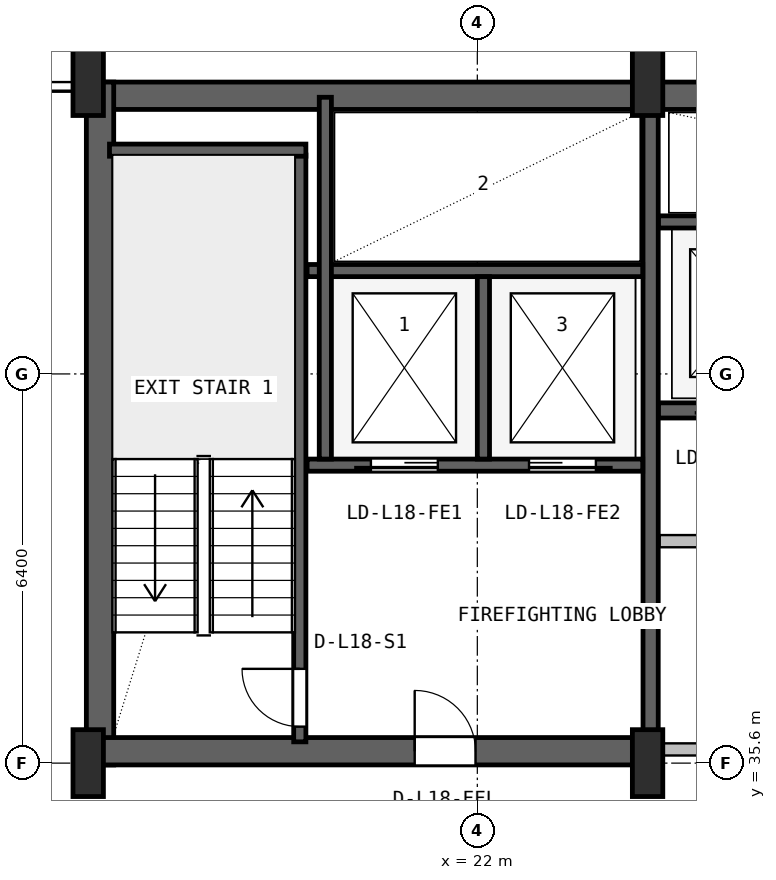
"""IFC4 building model, lengths in metres.
Left out: names, types, materials, properties, quantities, classifications, styles, units other than length and angle.
Written with IfcOpenShell. Run it as: python <this file> out.ifc"""

import sys

from ifc_helpers import new_model, si_unit, direction, frame, frame_2d, origin, origin_2d, place, context, subcontext, project, spatial, rectangle, i_section, extrude, source, transform, mapped, element, fill, save


model = new_model("IFC4")
c1 = context("Model", 3, precision=1e-05, world=origin(), true_north=direction((0.0, 1.0)))
c2 = subcontext(c1, "Body", "Model", "MODEL_VIEW")
j1 = project(units=[si_unit("LENGTHUNIT", "METRE"), si_unit("PLANEANGLEUNIT", "RADIAN")], contexts=[c1])
p1 = place(None, origin())
s1 = spatial("IfcSite", under=j1, at=p1, CompositionType="ELEMENT")
p2 = place(p1, origin())
s2 = spatial("IfcBuilding", under=s1, at=p2, CompositionType="ELEMENT")
p3 = place(p2, frame((0.0, 0.0, 78.3)))
s3 = spatial("IfcBuildingStorey", under=s2, at=p3, CompositionType="ELEMENT", Elevation=78.3)
p4 = place(p3, frame((15.6, 46.575, 0.0), z_axis=(0.0, 0.0, 1.0), x_axis=(1.0, 0.0, 0.0)))
e1 = element("IfcWall", 1, at=p4, inside=s3, PredefinedType="SHEAR", context=c2, shape_type="SweptSolid", body=[
    extrude(rectangle(XDim=36.8, YDim=0.45, at=frame_2d((18.4, 0.0))), origin(), (0.0, 0.0, 1.0), 3.58),
])
p5 = place(p3, frame((15.795, 35.57, 0.0), z_axis=(0.0, 0.0, 1.0), x_axis=(0.0, 1.0, 0.0)))
e2 = element("IfcWall", 2, at=p5, inside=s3, PredefinedType="SHEAR", context=c2, shape_type="SweptSolid", body=[
    extrude(rectangle(XDim=11.23, YDim=0.45, at=frame_2d((5.615, 0.0))), origin(), (0.0, 0.0, 1.0), 3.58),
])
p6 = place(p3, frame((15.57, 35.795, 0.0), z_axis=(0.0, 0.0, 1.0), x_axis=(1.0, 0.0, 0.0)))
e3 = element("IfcWall", 3, at=p6, inside=s3, PredefinedType="SHEAR", context=c2, shape_type="SweptSolid", body=[
    extrude(rectangle(XDim=9.23, YDim=0.45, at=frame_2d((4.615, 0.0))), origin(), (0.0, 0.0, 1.0), 3.58),
])
p7 = place(p6, frame((5.4, 0.0, 0.0)))
e4 = element("IfcOpeningElement", 4, at=p7, cuts=e3, PredefinedType="OPENING", context=c2, shape_type="SweptSolid", body=[
    extrude(rectangle(XDim=1.0, YDim=2.1, at=frame_2d((0.5, 1.05))), frame((0.0, 0.235, 0.0), z_axis=(0.0, -1.0, 0.0), x_axis=(1.0, 0.0, 0.0)), (0.0, 0.0, 1.0), 0.47),
])
m1 = source(origin(), c2, "Body", "SweptSolid", [
    extrude(i_section(OverallWidth=0.5, OverallDepth=1.1, WebThickness=0.018, FlangeThickness=0.032, FilletRadius=0.018, at=origin_2d()), origin(), (0.0, 0.0, 1.0), 3.9),
])
for number, where, z_axis, x_axis in (
    (5, (15.6, 35.6, 0.0), (0.0, 0.0, 1.0), (1.0, 0.0, 0.0)),
    (6, (15.6, 46.8, 0.0), (0.0, 0.0, 1.0), (1.0, 0.0, 0.0)),
    (7, (24.8, 35.6, 0.0), (0.0, 0.0, 1.0), (1.0, 0.0, 0.0)),
    (8, (24.8, 46.8, 0.0), (0.0, 0.0, 1.0), (1.0, 0.0, 0.0)),
):
    element("IfcColumn", number, at=place(p3, frame(where, z_axis=z_axis, x_axis=x_axis)), inside=s3, PredefinedType="COLUMN", context=c2, shape_type="MappedRepresentation", body=[
        mapped(m1, transform((0.0, 0.0, 0.0), x_axis=(1.0, 0.0, 0.0), y_axis=(0.0, 1.0, 0.0), z_axis=(0.0, 0.0, 1.0), scale=1.0)),
    ])
p8 = place(p3, frame((19.08, 35.95, 0.0), z_axis=(0.0, 0.0, 1.0), x_axis=(0.0, 1.0, 0.0)))
e9 = element("IfcWall", 9, at=p8, inside=s3, PredefinedType="SHEAR", context=c2, shape_type="SweptSolid", body=[
    extrude(rectangle(XDim=9.65, YDim=0.2, at=frame_2d((4.825, 0.0))), origin(), (0.0, 0.0, 1.0), 3.58),
])
p9 = place(p8, frame((0.25, 0.0, 0.0)))
e10 = element("IfcOpeningElement", 10, at=p9, cuts=e9, PredefinedType="OPENING", context=c2, shape_type="SweptSolid", body=[
    extrude(rectangle(XDim=0.95, YDim=2.1, at=frame_2d((0.475, 1.05))), frame((0.0, 0.11, 0.0), z_axis=(0.0, -1.0, 0.0), x_axis=(1.0, 0.0, 0.0)), (0.0, 0.0, 1.0), 0.22),
])
p10 = place(p3, frame((15.95, 45.68, 0.0), z_axis=(0.0, 0.0, 1.0), x_axis=(1.0, 0.0, 0.0)))
e11 = element("IfcWall", 11, at=p10, inside=s3, PredefinedType="SHEAR", context=c2, shape_type="SweptSolid", body=[
    extrude(rectangle(XDim=3.23, YDim=0.2, at=frame_2d((1.615, 0.0))), origin(), (0.0, 0.0, 1.0), 3.58),
])
p11 = place(p3, frame((24.85, 36.05, 0.0), z_axis=(0.0, 0.0, 1.0), x_axis=(0.0, 1.0, 0.0)))
e12 = element("IfcWall", 12, at=p11, inside=s3, PredefinedType="SHEAR", context=c2, shape_type="SweptSolid", body=[
    extrude(rectangle(XDim=10.45, YDim=0.25, at=frame_2d((5.225, 0.0))), origin(), (0.0, 0.0, 1.0), 3.58),
])
p12 = place(p3, frame((19.2, 40.5, 0.0), z_axis=(0.0, 0.0, 1.0), x_axis=(1.0, 0.0, 0.0)))
e13 = element("IfcWall", 13, at=p12, inside=s3, PredefinedType="SHEAR", context=c2, shape_type="SweptSolid", body=[
    extrude(rectangle(XDim=5.52, YDim=0.2, at=frame_2d((2.76, 0.0))), origin(), (0.0, 0.0, 1.0), 3.58),
])
p13 = place(p12, frame((1.05, 0.0, 0.0)))
e14 = element("IfcOpeningElement", 14, at=p13, cuts=e13, PredefinedType="OPENING", context=c2, shape_type="SweptSolid", body=[
    extrude(rectangle(XDim=1.1, YDim=2.18, at=frame_2d((0.55, 1.09))), frame((0.0, 0.11, 0.0), z_axis=(0.0, -1.0, 0.0), x_axis=(1.0, 0.0, 0.0)), (0.0, 0.0, 1.0), 0.22),
])
p14 = place(p12, frame((3.65, 0.0, 0.0)))
e15 = element("IfcOpeningElement", 15, at=p14, cuts=e13, PredefinedType="OPENING", context=c2, shape_type="SweptSolid", body=[
    extrude(rectangle(XDim=1.1, YDim=2.18, at=frame_2d((0.55, 1.09))), frame((0.0, 0.11, 0.0), z_axis=(0.0, -1.0, 0.0), x_axis=(1.0, 0.0, 0.0)), (0.0, 0.0, 1.0), 0.22),
])
p15 = place(p3, frame((19.2, 43.7, 0.0), z_axis=(0.0, 0.0, 1.0), x_axis=(1.0, 0.0, 0.0)))
e16 = element("IfcWall", 16, at=p15, inside=s3, PredefinedType="SHEAR", context=c2, shape_type="SweptSolid", body=[
    extrude(rectangle(XDim=5.52, YDim=0.2, at=frame_2d((2.76, 0.0))), origin(), (0.0, 0.0, 1.0), 3.58),
])
p16 = place(p3, frame((22.1, 40.6, 0.0), z_axis=(0.0, 0.0, 1.0), x_axis=(0.0, 1.0, 0.0)))
e17 = element("IfcWall", 17, at=p16, inside=s3, PredefinedType="SHEAR", context=c2, shape_type="SweptSolid", body=[
    extrude(rectangle(XDim=3.0, YDim=0.2, at=frame_2d((1.5, 0.0))), origin(), (0.0, 0.0, 1.0), 3.58),
])
p17 = place(p3, frame((19.5, 40.6, 0.0), z_axis=(0.0, 0.0, 1.0), x_axis=(0.0, 1.0, 0.0)))
e18 = element("IfcWall", 18, at=p17, inside=s3, PredefinedType="SHEAR", context=c2, shape_type="SweptSolid", body=[
    extrude(rectangle(XDim=5.95, YDim=0.2, at=frame_2d((2.975, 0.0))), origin(), (0.0, 0.0, 1.0), 3.58),
])
p18 = place(p3, frame((24.98, 41.4, 0.0), z_axis=(0.0, 0.0, 1.0), x_axis=(1.0, 0.0, 0.0)))
e19 = element("IfcWall", 19, at=p18, inside=s3, PredefinedType="SHEAR", context=c2, shape_type="SweptSolid", body=[
    extrude(rectangle(XDim=23.82, YDim=0.25, at=frame_2d((11.91, 0.0))), origin(), (0.0, 0.0, 1.0), 3.58),
])
p19 = place(p18, frame((0.87, 0.0, 0.0)))
e20 = element("IfcOpeningElement", 20, at=p19, cuts=e19, PredefinedType="OPENING", context=c2, shape_type="SweptSolid", body=[
    extrude(rectangle(XDim=1.1, YDim=2.18, at=frame_2d((0.55, 1.09))), frame((0.0, 0.135, 0.0), z_axis=(0.0, -1.0, 0.0), x_axis=(1.0, 0.0, 0.0)), (0.0, 0.0, 1.0), 0.27),
])
p20 = place(p18, frame((3.47, 0.0, 0.0)))
e21 = element("IfcOpeningElement", 21, at=p20, cuts=e19, PredefinedType="OPENING", context=c2, shape_type="SweptSolid", body=[
    extrude(rectangle(XDim=1.1, YDim=2.18, at=frame_2d((0.55, 1.09))), frame((0.0, 0.135, 0.0), z_axis=(0.0, -1.0, 0.0), x_axis=(1.0, 0.0, 0.0)), (0.0, 0.0, 1.0), 0.27),
])
p21 = place(p18, frame((6.07, 0.0, 0.0)))
e22 = element("IfcOpeningElement", 22, at=p21, cuts=e19, PredefinedType="OPENING", context=c2, shape_type="SweptSolid", body=[
    extrude(rectangle(XDim=1.1, YDim=2.18, at=frame_2d((0.55, 1.09))), frame((0.0, 0.135, 0.0), z_axis=(0.0, -1.0, 0.0), x_axis=(1.0, 0.0, 0.0)), (0.0, 0.0, 1.0), 0.27),
])
p22 = place(p3, frame((24.98, 44.5, 0.0), z_axis=(0.0, 0.0, 1.0), x_axis=(1.0, 0.0, 0.0)))
e23 = element("IfcWall", 23, at=p22, inside=s3, PredefinedType="SHEAR", context=c2, shape_type="SweptSolid", body=[
    extrude(rectangle(XDim=7.87, YDim=0.2, at=frame_2d((3.935, 0.0))), origin(), (0.0, 0.0, 1.0), 3.58),
])
p23 = place(p3, frame((25.0, 35.825, 0.0), z_axis=(0.0, 0.0, 1.0), x_axis=(1.0, 0.0, 0.0)))
e24 = element("IfcWall", 24, at=p23, inside=s3, PredefinedType="PLUMBINGWALL", context=c2, shape_type="SweptSolid", body=[
    extrude(rectangle(XDim=9.75, YDim=0.2, at=frame_2d((4.875, 0.0))), origin(), (0.0, 0.0, 1.0), 2.355),
])
p24 = place(p3, frame((25.0, 39.25, 0.0), z_axis=(0.0, 0.0, 1.0), x_axis=(1.0, 0.0, 0.0)))
e25 = element("IfcWall", 25, at=p24, inside=s3, PredefinedType="PLUMBINGWALL", context=c2, shape_type="SweptSolid", body=[
    extrude(rectangle(XDim=9.75, YDim=0.2, at=frame_2d((4.875, 0.0))), origin(), (0.0, 0.0, 1.0), 3.56),
])
p25 = place(p24, frame((1.75, 0.0, 0.0)))
e26 = element("IfcOpeningElement", 26, at=p25, cuts=e25, PredefinedType="OPENING", context=c2, shape_type="SweptSolid", body=[
    extrude(rectangle(XDim=0.9, YDim=2.06, at=frame_2d((0.45, 1.03))), frame((0.0, 0.11, 0.0), z_axis=(0.0, -1.0, 0.0), x_axis=(1.0, 0.0, 0.0)), (0.0, 0.0, 1.0), 0.22),
])
p26 = place(p24, frame((6.725, 0.0, 0.0)))
e27 = element("IfcOpeningElement", 27, at=p26, cuts=e25, PredefinedType="OPENING", context=c2, shape_type="SweptSolid", body=[
    extrude(rectangle(XDim=0.9, YDim=2.06, at=frame_2d((0.45, 1.03))), frame((0.0, 0.11, 0.0), z_axis=(0.0, -1.0, 0.0), x_axis=(1.0, 0.0, 0.0)), (0.0, 0.0, 1.0), 0.22),
])
m2 = source(origin(), c2, "Body", "SweptSolid", [
    extrude(rectangle(XDim=0.95, YDim=2.1, at=frame_2d((0.475, 1.05))), frame((0.0, 0.025, 0.0), z_axis=(0.0, -1.0, 0.0), x_axis=(1.0, 0.0, 0.0)), (0.0, 0.0, 1.0), 0.05),
])
p27 = place(p9, origin())
e28 = element("IfcDoor", 28, at=p27, inside=s3, OperationType="SINGLE_SWING_RIGHT", PredefinedType="DOOR", context=c2, shape_type="MappedRepresentation", body=[
    mapped(m2, transform((0.0, 0.0, 0.0), x_axis=(1.0, 0.0, 0.0), y_axis=(0.0, 1.0, 0.0), z_axis=(0.0, 0.0, 1.0), scale=1.0)),
])
fill(e10, e28)
m3 = source(origin(), c2, "Body", "SweptSolid", [
    extrude(rectangle(XDim=1.0, YDim=2.1, at=frame_2d((0.5, 1.05))), frame((0.0, 0.025, 0.0), z_axis=(0.0, -1.0, 0.0), x_axis=(1.0, 0.0, 0.0)), (0.0, 0.0, 1.0), 0.05),
])
p28 = place(p7, origin())
e29 = element("IfcDoor", 29, at=p28, inside=s3, OperationType="SINGLE_SWING_LEFT", PredefinedType="DOOR", context=c2, shape_type="MappedRepresentation", body=[
    mapped(m3, transform((0.0, 0.0, 0.0), x_axis=(1.0, 0.0, 0.0), y_axis=(0.0, 1.0, 0.0), z_axis=(0.0, 0.0, 1.0), scale=1.0)),
])
fill(e4, e29)
m4 = source(origin(), c2, "Body", "SweptSolid", [
    extrude(rectangle(XDim=1.1, YDim=2.18, at=frame_2d((0.55, 1.09))), frame((0.0, 0.025, 0.0), z_axis=(0.0, -1.0, 0.0), x_axis=(1.0, 0.0, 0.0)), (0.0, 0.0, 1.0), 0.05),
])
p29 = place(p13, frame((1.1, 0.0, 0.0), z_axis=(0.0, 0.0, 1.0), x_axis=(-1.0, 0.0, 0.0)))
e30 = element("IfcDoor", 30, at=p29, inside=s3, OperationType="SLIDING_TO_LEFT", PredefinedType="DOOR", context=c2, shape_type="MappedRepresentation", body=[
    mapped(m4, transform((0.0, 0.0, 0.0), x_axis=(1.0, 0.0, 0.0), y_axis=(0.0, 1.0, 0.0), z_axis=(0.0, 0.0, 1.0), scale=1.0)),
])
fill(e14, e30)
p30 = place(p14, frame((1.1, 0.0, 0.0), z_axis=(0.0, 0.0, 1.0), x_axis=(-1.0, 0.0, 0.0)))
e31 = element("IfcDoor", 31, at=p30, inside=s3, OperationType="SLIDING_TO_RIGHT", PredefinedType="DOOR", context=c2, shape_type="MappedRepresentation", body=[
    mapped(m4, transform((0.0, 0.0, 0.0), x_axis=(1.0, 0.0, 0.0), y_axis=(0.0, 1.0, 0.0), z_axis=(0.0, 0.0, 1.0), scale=1.0)),
])
fill(e15, e31)
save(model, sys.argv[1])
